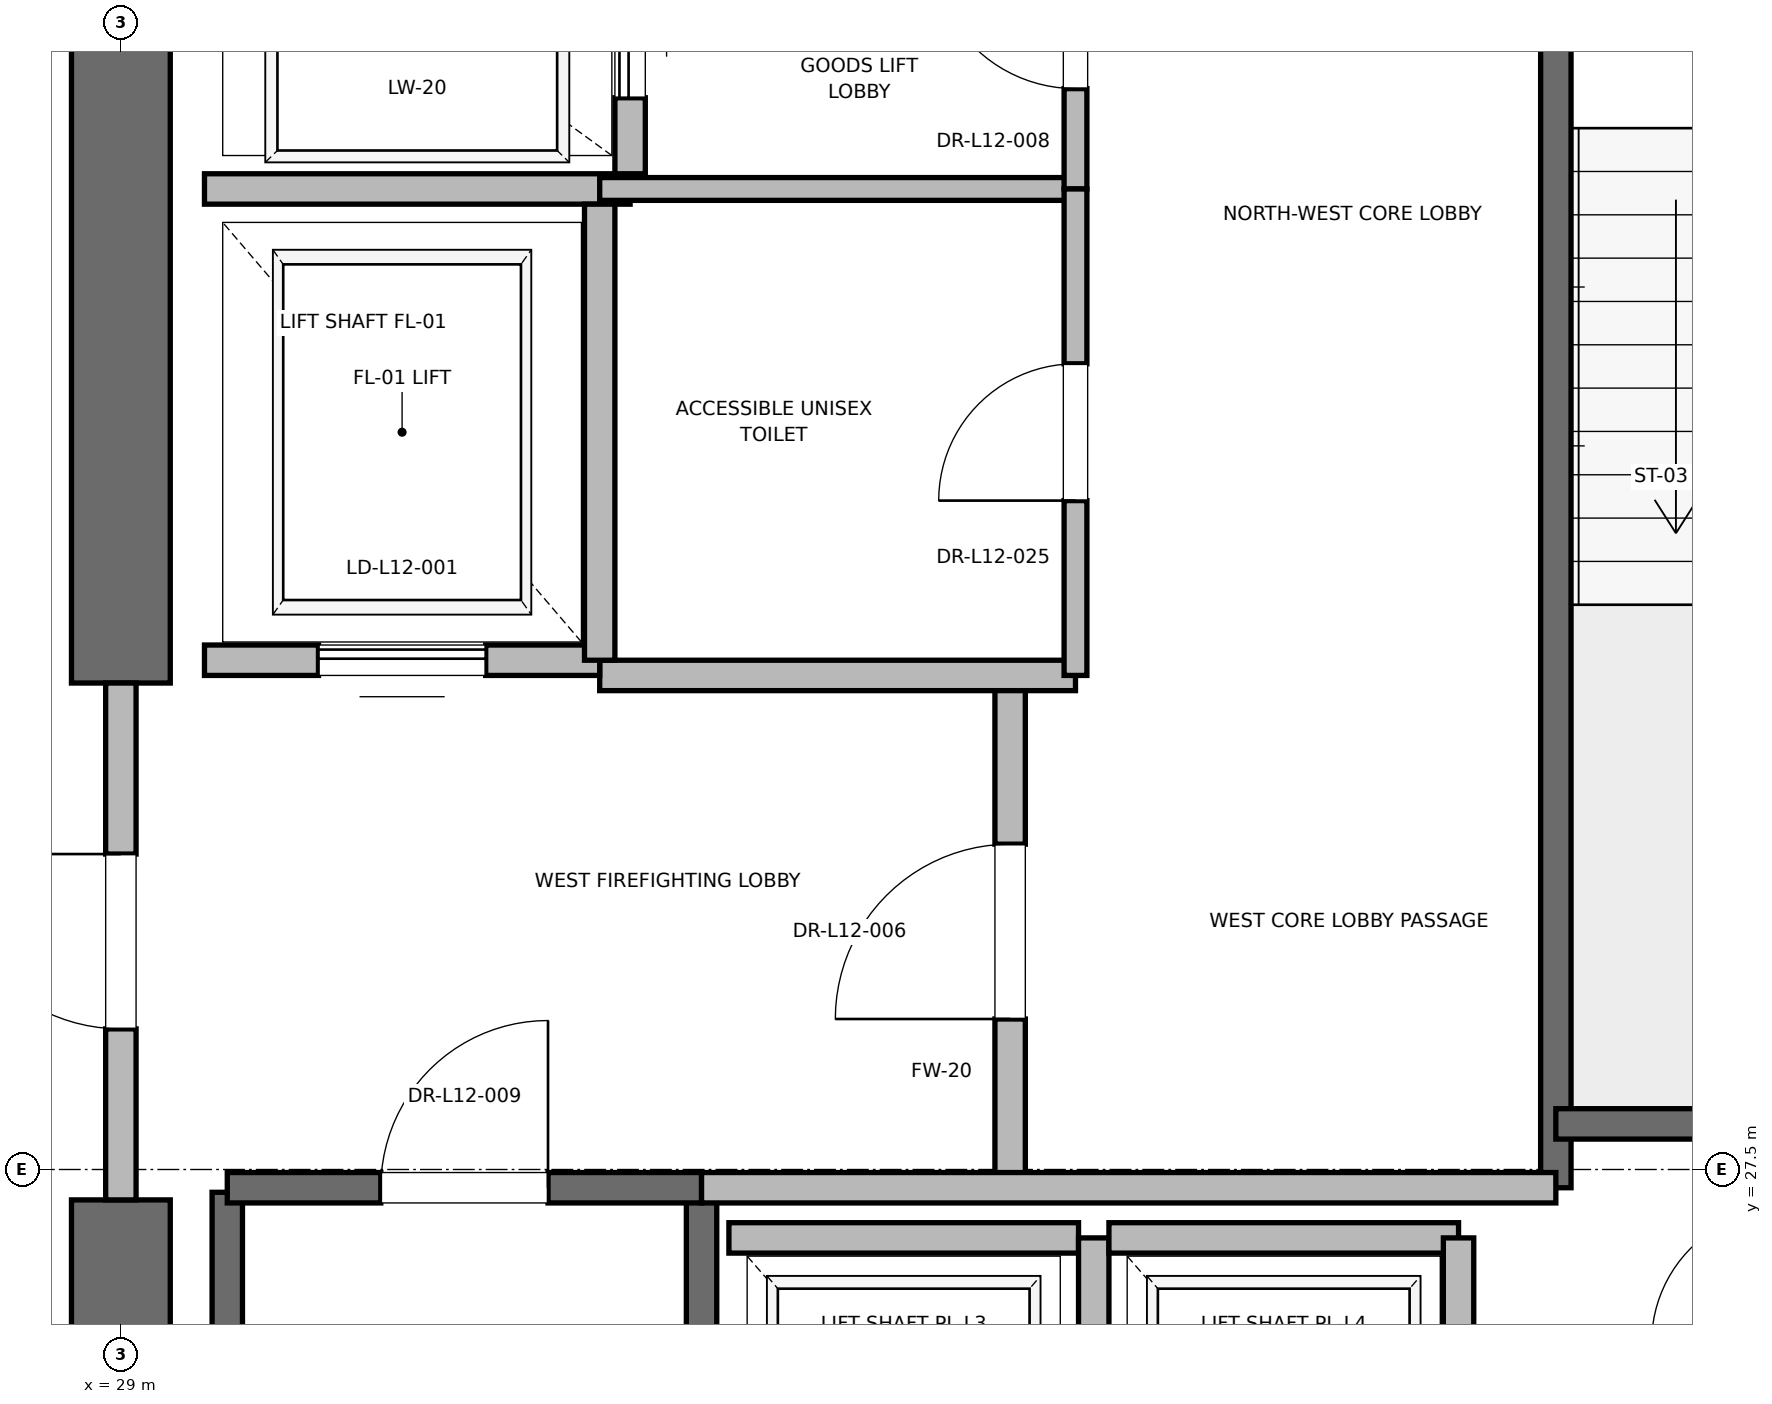
"""IFC4 building model, lengths in metres.
Left out: names, types, materials, properties, quantities, classifications, styles, units other than length and angle.
Written with IfcOpenShell. Run it as: python <this file> out.ifc"""

import sys

from ifc_helpers import new_model, si_unit, direction, frame, frame_2d, origin, place, context, subcontext, project, spatial, rectangle, extrude, element, fill, save


model = new_model("IFC4")
c1 = context("Model", 3, precision=1e-05, world=origin(), true_north=direction((0.0, 1.0)))
c2 = subcontext(c1, "Body", "Model", "MODEL_VIEW")
j1 = project(units=[si_unit("LENGTHUNIT", "METRE"), si_unit("PLANEANGLEUNIT", "RADIAN")], contexts=[c1])
p1 = place(None, origin())
s1 = spatial("IfcSite", under=j1, at=p1, CompositionType="ELEMENT")
p2 = place(p1, origin())
s2 = spatial("IfcBuilding", under=s1, at=p2, CompositionType="ELEMENT")
p3 = place(p2, frame((0.0, 0.0, 55.6)))
s3 = spatial("IfcBuildingStorey", under=s2, at=p3, CompositionType="ELEMENT", Elevation=55.6)
p4 = place(p3, frame((29.0, 18.5, 0.0), z_axis=(0.0, 0.0, 1.0), x_axis=(0.0, 1.0, 0.0)))
e1 = element("IfcWall", 1, at=p4, inside=s3, PredefinedType="SHEAR", context=c2, shape_type="SweptSolid", body=[
    extrude(rectangle(XDim=8.8, YDim=0.65, at=frame_2d((4.4, 0.0))), origin(), (0.0, 0.0, 1.0), 3.76),
])
p5 = place(p3, frame((29.0, 30.7, 0.0), z_axis=(0.0, 0.0, 1.0), x_axis=(0.0, 1.0, 0.0)))
e2 = element("IfcWall", 2, at=p5, inside=s3, PredefinedType="SHEAR", context=c2, shape_type="SweptSolid", body=[
    extrude(rectangle(XDim=5.8, YDim=0.65, at=frame_2d((2.9, 0.0))), origin(), (0.0, 0.0, 1.0), 3.76),
])
p6 = place(p3, frame((29.7, 19.2, 0.0), z_axis=(0.0, 0.0, 1.0), x_axis=(0.0, 1.0, 0.0)))
e3 = element("IfcWall", 3, at=p6, inside=s3, PredefinedType="SOLIDWALL", context=c2, shape_type="SweptSolid", body=[
    extrude(rectangle(XDim=8.15, YDim=0.2, at=frame_2d((4.075, 0.0))), origin(), (0.0, 0.0, 1.0), 3.76),
])
p7 = place(p3, frame((32.82, 18.6, 0.0), z_axis=(0.0, 0.0, 1.0), x_axis=(0.0, 1.0, 0.0)))
e4 = element("IfcWall", 4, at=p7, inside=s3, PredefinedType="SOLIDWALL", context=c2, shape_type="SweptSolid", body=[
    extrude(rectangle(XDim=8.78, YDim=0.2, at=frame_2d((4.39, 0.0))), origin(), (0.0, 0.0, 1.0), 3.76),
])
p8 = place(p3, frame((29.7, 27.38, 0.0), z_axis=(0.0, 0.0, 1.0), x_axis=(1.0, 0.0, 0.0)))
e5 = element("IfcWall", 5, at=p8, inside=s3, PredefinedType="SOLIDWALL", context=c2, shape_type="SweptSolid", body=[
    extrude(rectangle(XDim=3.12, YDim=0.2, at=frame_2d((1.56, 0.0))), origin(), (0.0, 0.0, 1.0), 3.76),
])
p9 = place(p8, frame((1.01, 0.0, 0.0)))
e6 = element("IfcOpeningElement", 6, at=p9, cuts=e5, PredefinedType="OPENING", context=c2, shape_type="SweptSolid", body=[
    extrude(rectangle(XDim=1.1, YDim=2.15, at=frame_2d((0.55, 1.075))), frame((0.0, 0.1, 0.0), z_axis=(0.0, -1.0, 0.0), x_axis=(1.0, 0.0, 0.0)), (0.0, 0.0, 1.0), 0.2),
])
p10 = place(p3, frame((38.44, 27.38, 0.0), z_axis=(0.0, 0.0, 1.0), x_axis=(0.0, 1.0, 0.0)))
e7 = element("IfcWall", 7, at=p10, inside=s3, PredefinedType="SOLIDWALL", context=c2, shape_type="SweptSolid", body=[
    extrude(rectangle(XDim=8.87, YDim=0.2, at=frame_2d((4.435, 0.0))), origin(), (0.0, 0.0, 1.0), 3.76),
])
p11 = place(p3, frame((38.44, 27.8, 0.0), z_axis=(0.0, 0.0, 1.0), x_axis=(1.0, 0.0, 0.0)))
e8 = element("IfcWall", 8, at=p11, inside=s3, PredefinedType="SOLIDWALL", context=c2, shape_type="SweptSolid", body=[
    extrude(rectangle(XDim=3.32, YDim=0.2, at=frame_2d((1.66, 0.0))), origin(), (0.0, 0.0, 1.0), 3.76),
])
p12 = place(p3, frame((34.85, 27.38, 0.0), z_axis=(0.0, 0.0, 1.0), x_axis=(0.0, 1.0, 0.0)))
e9 = element("IfcWall", 9, at=p12, inside=s3, PredefinedType="PARTITIONING", context=c2, shape_type="SweptSolid", body=[
    extrude(rectangle(XDim=3.37, YDim=0.2, at=frame_2d((1.685, 0.0))), origin(), (0.0, 0.0, 1.0), 3.76),
])
p13 = place(p12, frame((1.11, 0.0, 0.0)))
e10 = element("IfcOpeningElement", 10, at=p13, cuts=e9, PredefinedType="OPENING", context=c2, shape_type="SweptSolid", body=[
    extrude(rectangle(XDim=1.15, YDim=2.2, at=frame_2d((0.575, 1.1))), frame((0.0, 0.1, 0.0), z_axis=(0.0, -1.0, 0.0), x_axis=(1.0, 0.0, 0.0)), (0.0, 0.0, 1.0), 0.2),
])
p14 = place(p3, frame((29.0, 27.3, 0.0), z_axis=(0.0, 0.0, 1.0), x_axis=(0.0, 1.0, 0.0)))
e11 = element("IfcWall", 11, at=p14, inside=s3, PredefinedType="PARTITIONING", context=c2, shape_type="SweptSolid", body=[
    extrude(rectangle(XDim=3.4, YDim=0.2, at=frame_2d((1.7, 0.0))), origin(), (0.0, 0.0, 1.0), 2.54),
])
p15 = place(p14, frame((1.125, 0.0, 0.0)))
e12 = element("IfcOpeningElement", 12, at=p15, cuts=e11, PredefinedType="OPENING", context=c2, shape_type="SweptSolid", body=[
    extrude(rectangle(XDim=1.15, YDim=2.2, at=frame_2d((0.575, 1.1))), frame((0.0, 0.1, 0.0), z_axis=(0.0, -1.0, 0.0), x_axis=(1.0, 0.0, 0.0)), (0.0, 0.0, 1.0), 0.2),
])
p16 = place(p3, frame((32.82, 27.38, 0.0), z_axis=(0.0, 0.0, 1.0), x_axis=(1.0, 0.0, 0.0)))
e13 = element("IfcWall", 13, at=p16, inside=s3, PredefinedType="PARTITIONING", context=c2, shape_type="SweptSolid", body=[
    extrude(rectangle(XDim=5.62, YDim=0.2, at=frame_2d((2.81, 0.0))), origin(), (0.0, 0.0, 1.0), 3.76),
])
p17 = place(p3, frame((32.15, 30.75, 0.0), z_axis=(0.0, 0.0, 1.0), x_axis=(1.0, 0.0, 0.0)))
e14 = element("IfcWall", 14, at=p17, inside=s3, PredefinedType="PARTITIONING", context=c2, shape_type="SweptSolid", body=[
    extrude(rectangle(XDim=3.13, YDim=0.2, at=frame_2d((1.565, 0.0))), origin(), (0.0, 0.0, 1.0), 3.76),
])
p18 = place(p3, frame((29.55, 30.85, 0.0), z_axis=(0.0, 0.0, 1.0), x_axis=(1.0, 0.0, 0.0)))
e15 = element("IfcWall", 15, at=p18, inside=s3, PredefinedType="SOLIDWALL", context=c2, shape_type="SweptSolid", body=[
    extrude(rectangle(XDim=2.6, YDim=0.2, at=frame_2d((1.3, 0.0))), origin(), (0.0, 0.0, 1.0), 2.54),
])
p19 = place(p18, frame((0.75, 0.0, 0.0)))
e16 = element("IfcOpeningElement", 16, at=p19, cuts=e15, PredefinedType="OPENING", context=c2, shape_type="SweptSolid", body=[
    extrude(rectangle(XDim=1.1, YDim=2.2, at=frame_2d((0.55, 1.1))), frame((0.0, 0.1, 0.0), z_axis=(0.0, -1.0, 0.0), x_axis=(1.0, 0.0, 0.0)), (0.0, 0.0, 1.0), 0.2),
])
p20 = place(p3, frame((29.55, 33.95, 0.0), z_axis=(0.0, 0.0, 1.0), x_axis=(1.0, 0.0, 0.0)))
e17 = element("IfcWall", 17, at=p20, inside=s3, PredefinedType="SOLIDWALL", context=c2, shape_type="SweptSolid", body=[
    extrude(rectangle(XDim=2.8, YDim=0.2, at=frame_2d((1.4, 0.0))), origin(), (0.0, 0.0, 1.0), 3.76),
])
p21 = place(p3, frame((32.15, 30.85, 0.0), z_axis=(0.0, 0.0, 1.0), x_axis=(0.0, 1.0, 0.0)))
e18 = element("IfcWall", 18, at=p21, inside=s3, PredefinedType="SOLIDWALL", context=c2, shape_type="SweptSolid", body=[
    extrude(rectangle(XDim=3.0, YDim=0.2, at=frame_2d((1.5, 0.0))), origin(), (0.0, 0.0, 1.0), 3.76),
])
p22 = place(p3, frame((32.35, 34.05, 0.0), z_axis=(0.0, 0.0, 1.0), x_axis=(0.0, 1.0, 0.0)))
e19 = element("IfcWall", 19, at=p22, inside=s3, PredefinedType="SOLIDWALL", context=c2, shape_type="SweptSolid", body=[
    extrude(rectangle(XDim=2.1, YDim=0.2, at=frame_2d((1.05, 0.0))), origin(), (0.0, 0.0, 1.0), 3.76),
])
p23 = place(p22, frame((0.5, 0.0, 0.0)))
e20 = element("IfcOpeningElement", 20, at=p23, cuts=e19, PredefinedType="OPENING", context=c2, shape_type="SweptSolid", body=[
    extrude(rectangle(XDim=1.1, YDim=2.2, at=frame_2d((0.55, 1.1))), frame((0.0, 0.1, 0.0), z_axis=(0.0, -1.0, 0.0), x_axis=(1.0, 0.0, 0.0)), (0.0, 0.0, 1.0), 0.2),
])
p24 = place(p3, frame((35.3, 27.05, 0.0), z_axis=(0.0, 0.0, 1.0), x_axis=(-1.0, 0.0, 0.0)))
e21 = element("IfcWall", 21, at=p24, inside=s3, PredefinedType="SOLIDWALL", context=c2, shape_type="SweptSolid", body=[
    extrude(rectangle(XDim=2.3, YDim=0.2, at=frame_2d((1.15, 0.0))), origin(), (0.0, 0.0, 1.0), 3.76),
])
p25 = place(p3, frame((35.4, 24.45, 0.0), z_axis=(0.0, 0.0, 1.0), x_axis=(0.0, 1.0, 0.0)))
e22 = element("IfcWall", 22, at=p25, inside=s3, PredefinedType="SOLIDWALL", context=c2, shape_type="SweptSolid", body=[
    extrude(rectangle(XDim=2.6, YDim=0.2, at=frame_2d((1.3, 0.0))), origin(), (0.0, 0.0, 1.0), 3.76),
])
p26 = place(p3, frame((37.8, 27.05, 0.0), z_axis=(0.0, 0.0, 1.0), x_axis=(-1.0, 0.0, 0.0)))
e23 = element("IfcWall", 23, at=p26, inside=s3, PredefinedType="SOLIDWALL", context=c2, shape_type="SweptSolid", body=[
    extrude(rectangle(XDim=2.3, YDim=0.2, at=frame_2d((1.15, 0.0))), origin(), (0.0, 0.0, 1.0), 3.76),
])
p27 = place(p3, frame((37.8, 24.45, 0.0), z_axis=(0.0, 0.0, 1.0), x_axis=(0.0, 1.0, 0.0)))
e24 = element("IfcWall", 24, at=p27, inside=s3, PredefinedType="SOLIDWALL", context=c2, shape_type="SweptSolid", body=[
    extrude(rectangle(XDim=2.6, YDim=0.2, at=frame_2d((1.3, 0.0))), origin(), (0.0, 0.0, 1.0), 3.76),
])
p28 = place(p3, frame((32.15, 33.95, 0.0), z_axis=(0.0, 0.0, 1.0), x_axis=(1.0, 0.0, 0.0)))
e25 = element("IfcWall", 25, at=p28, inside=s3, PredefinedType="PARTITIONING", context=c2, shape_type="SweptSolid", body=[
    extrude(rectangle(XDim=3.13, YDim=0.15, at=frame_2d((1.565, 0.0))), origin(), (0.0, 0.0, 1.0), 2.85),
])
p29 = place(p3, frame((35.28, 33.95, 0.0), z_axis=(0.0, 0.0, 1.0), x_axis=(0.0, 1.0, 0.0)))
e26 = element("IfcWall", 26, at=p29, inside=s3, PredefinedType="PARTITIONING", context=c2, shape_type="SweptSolid", body=[
    extrude(rectangle(XDim=2.27, YDim=0.15, at=frame_2d((1.135, 0.0))), origin(), (0.0, 0.0, 1.0), 2.54),
])
p30 = place(p29, frame((0.66, 0.0, 0.0)))
e27 = element("IfcOpeningElement", 27, at=p30, cuts=e26, PredefinedType="OPENING", context=c2, shape_type="SweptSolid", body=[
    extrude(rectangle(XDim=0.95, YDim=2.15, at=frame_2d((0.475, 1.075))), frame((0.0, 0.075, 0.0), z_axis=(0.0, -1.0, 0.0), x_axis=(1.0, 0.0, 0.0)), (0.0, 0.0, 1.0), 0.15),
])
p31 = place(p3, frame((35.28, 30.75, 0.0), z_axis=(0.0, 0.0, 1.0), x_axis=(0.0, 1.0, 0.0)))
e28 = element("IfcWall", 28, at=p31, inside=s3, PredefinedType="PARTITIONING", context=c2, shape_type="SweptSolid", body=[
    extrude(rectangle(XDim=3.2, YDim=0.15, at=frame_2d((1.6, 0.0))), origin(), (0.0, 0.0, 1.0), 2.85),
])
p32 = place(p31, frame((1.15, 0.0, 0.0)))
e29 = element("IfcOpeningElement", 29, at=p32, cuts=e28, PredefinedType="OPENING", context=c2, shape_type="SweptSolid", body=[
    extrude(rectangle(XDim=0.9, YDim=2.1, at=frame_2d((0.45, 1.05))), frame((0.0, 0.075, 0.0), z_axis=(0.0, -1.0, 0.0), x_axis=(1.0, 0.0, 0.0)), (0.0, 0.0, 1.0), 0.15),
])
p33 = place(p9, origin())
e30 = element("IfcDoor", 30, at=p33, inside=s3, OperationType="SINGLE_SWING_RIGHT", PredefinedType="DOOR", context=c2, shape_type="SweptSolid", body=[
    extrude(rectangle(XDim=1.1, YDim=2.15, at=frame_2d((0.55, 1.075))), frame((0.0, 0.025, 0.0), z_axis=(0.0, -1.0, 0.0), x_axis=(1.0, 0.0, 0.0)), (0.0, 0.0, 1.0), 0.05),
])
fill(e6, e30)
p34 = place(p13, origin())
e31 = element("IfcDoor", 31, at=p34, inside=s3, OperationType="SINGLE_SWING_LEFT", PredefinedType="DOOR", context=c2, shape_type="SweptSolid", body=[
    extrude(rectangle(XDim=1.15, YDim=2.2, at=frame_2d((0.575, 1.1))), frame((0.0, 0.025, 0.0), z_axis=(0.0, -1.0, 0.0), x_axis=(1.0, 0.0, 0.0)), (0.0, 0.0, 1.0), 0.05),
])
fill(e10, e31)
p35 = place(p15, origin())
e32 = element("IfcDoor", 32, at=p35, inside=s3, OperationType="SINGLE_SWING_RIGHT", PredefinedType="DOOR", context=c2, shape_type="SweptSolid", body=[
    extrude(rectangle(XDim=1.15, YDim=2.2, at=frame_2d((0.575, 1.1))), frame((0.0, 0.025, 0.0), z_axis=(0.0, -1.0, 0.0), x_axis=(1.0, 0.0, 0.0)), (0.0, 0.0, 1.0), 0.05),
])
fill(e12, e32)
p36 = place(p19, origin())
e33 = element("IfcDoor", 33, at=p36, inside=s3, OperationType="SLIDING_TO_RIGHT", PredefinedType="DOOR", context=c2, shape_type="SweptSolid", body=[
    extrude(rectangle(XDim=1.1, YDim=2.2, at=frame_2d((0.55, 1.1))), frame((0.0, 0.025, 0.0), z_axis=(0.0, -1.0, 0.0), x_axis=(1.0, 0.0, 0.0)), (0.0, 0.0, 1.0), 0.05),
])
fill(e16, e33)
p37 = place(p23, origin())
e34 = element("IfcDoor", 34, at=p37, inside=s3, OperationType="SLIDING_TO_RIGHT", PredefinedType="DOOR", context=c2, shape_type="SweptSolid", body=[
    extrude(rectangle(XDim=1.1, YDim=2.2, at=frame_2d((0.55, 1.1))), frame((0.0, 0.025, 0.0), z_axis=(0.0, -1.0, 0.0), x_axis=(1.0, 0.0, 0.0)), (0.0, 0.0, 1.0), 0.05),
])
fill(e20, e34)
p38 = place(p30, origin())
e35 = element("IfcDoor", 35, at=p38, inside=s3, OperationType="SINGLE_SWING_RIGHT", PredefinedType="DOOR", context=c2, shape_type="SweptSolid", body=[
    extrude(rectangle(XDim=0.95, YDim=2.15, at=frame_2d((0.475, 1.075))), frame((0.0, 0.025, 0.0), z_axis=(0.0, -1.0, 0.0), x_axis=(1.0, 0.0, 0.0)), (0.0, 0.0, 1.0), 0.05),
])
fill(e27, e35)
p39 = place(p32, origin())
e36 = element("IfcDoor", 36, at=p39, inside=s3, OperationType="SINGLE_SWING_LEFT", PredefinedType="DOOR", context=c2, shape_type="SweptSolid", body=[
    extrude(rectangle(XDim=0.9, YDim=2.1, at=frame_2d((0.45, 1.05))), frame((0.0, 0.025, 0.0), z_axis=(0.0, -1.0, 0.0), x_axis=(1.0, 0.0, 0.0)), (0.0, 0.0, 1.0), 0.05),
])
fill(e29, e36)
save(model, sys.argv[1])
